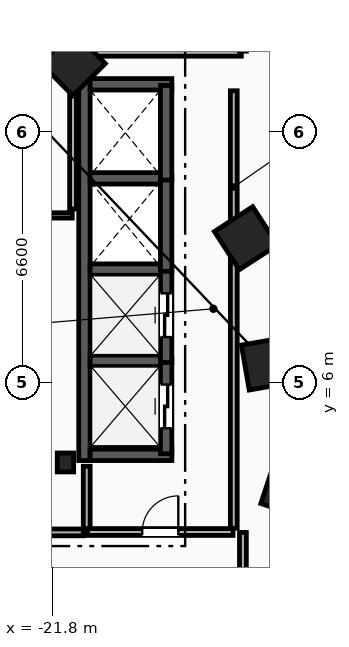
"""IFC4 building model, lengths in metres.
Left out: names, types, materials, properties, quantities, classifications, styles, units other than length and angle.
Written with IfcOpenShell. Run it as: python <this file> out.ifc"""

import sys

from ifc_helpers import new_model, si_unit, direction, frame, frame_2d, origin, origin_2d, place, context, subcontext, project, spatial, rectangle, i_section, extrude, element, fill, save


model = new_model("IFC4")
c1 = context("Model", 3, precision=1e-05, world=origin(), true_north=direction((0.0, 1.0)))
c2 = subcontext(c1, "Body", "Model", "MODEL_VIEW")
j1 = project(units=[si_unit("LENGTHUNIT", "METRE"), si_unit("PLANEANGLEUNIT", "RADIAN")], contexts=[c1])
p1 = place(None, origin())
s1 = spatial("IfcSite", under=j1, at=p1, CompositionType="ELEMENT")
p2 = place(p1, origin())
s2 = spatial("IfcBuilding", under=s1, at=p2, CompositionType="ELEMENT")
p3 = place(p2, frame((0.0, 0.0, 65.8)))
s3 = spatial("IfcBuildingStorey", under=s2, at=p3, CompositionType="ELEMENT", Elevation=65.8)
p4 = place(p3, frame((-21.45, 3.9, 0.0), z_axis=(0.0, 0.0, 1.0), x_axis=(1.0, 0.0, 0.0)))
e1 = element("IfcColumn", 1, at=p4, inside=s3, PredefinedType="COLUMN", context=c2, shape_type="SweptSolid", body=[
    extrude(i_section(OverallWidth=0.432, OverallDepth=0.498, WebThickness=0.056, FlangeThickness=0.089, FilletRadius=0.018, at=origin_2d()), origin(), (0.0, 0.0, 1.0), 3.8),
])
for number, where, z_axis, x_axis in (
    (2, (-15.55, 3.2, 0.0), (0.0, 0.0, 1.0), (0.315, 0.949, 0.0)),
    (3, (-16.125, 6.5, 0.0), (0.0, 0.0, 1.0), (-0.172, 0.985, 0.0)),
    (4, (-16.7, 9.8, 0.0), (0.0, 0.0, 1.0), (-0.544, 0.839, 0.0)),
    (5, (-21.25, 14.4, 0.0), (0.0, 0.0, 1.0), (-0.703, 0.711, 0.0)),
):
    element("IfcColumn", number, at=place(p3, frame(where, z_axis=z_axis, x_axis=x_axis)), inside=s3, PredefinedType="COLUMN", context=c2, shape_type="SweptSolid", body=[
        extrude(rectangle(XDim=1.2, YDim=1.2, at=origin_2d()), origin(), (0.0, 0.0, 1.0), 3.8),
    ])
p5 = place(p3, frame((-20.89, 2.15, 0.0), z_axis=(0.0, 0.0, 1.0), x_axis=(0.0, 1.0, 0.0)))
e6 = element("IfcWall", 6, at=p5, inside=s3, PredefinedType="PARTITIONING", context=c2, shape_type="SweptSolid", body=[
    extrude(rectangle(XDim=1.65, YDim=0.18, at=frame_2d((0.825, 0.0))), origin(), (0.0, 0.0, 1.0), 3.5),
])
p6 = place(p3, frame((-23.98, 2.06, 0.0), z_axis=(0.0, 0.0, 1.0), x_axis=(1.0, 0.0, 0.0)))
e7 = element("IfcWall", 7, at=p6, inside=s3, PredefinedType="PARTITIONING", context=c2, shape_type="SweptSolid", body=[
    extrude(rectangle(XDim=3.0, YDim=0.18, at=frame_2d((1.5, 0.0))), origin(), (0.0, 0.0, 1.0), 3.5),
])
p7 = place(p6, frame((0.9, 0.0, 0.0)))
e8 = element("IfcOpeningElement", 8, at=p7, cuts=e7, PredefinedType="OPENING", context=c2, shape_type="SweptSolid", body=[
    extrude(rectangle(XDim=1.2, YDim=2.15, at=frame_2d((0.6, 1.075))), frame((0.0, 0.1, 0.0), z_axis=(0.0, -1.0, 0.0), x_axis=(1.0, 0.0, 0.0)), (0.0, 0.0, 1.0), 0.2),
])
p8 = place(p3, frame((-20.95, 3.95, 0.0), z_axis=(0.0, 0.0, 1.0), x_axis=(0.0, 1.0, 0.0)))
e9 = element("IfcWall", 9, at=p8, inside=s3, PredefinedType="SHEAR", context=c2, shape_type="SweptSolid", body=[
    extrude(rectangle(XDim=10.05, YDim=0.3, at=frame_2d((5.025, 0.0))), origin(), (0.0, 0.0, 1.0), 3.5),
])
for number, where, z_axis, x_axis in (
    (10, (-20.8, 4.1, 0.0), (0.0, 0.0, 1.0), (1.0, 0.0, 0.0)),
    (11, (-20.8, 13.85, 0.0), (0.0, 0.0, 1.0), (1.0, 0.0, 0.0)),
):
    element("IfcWall", number, at=place(p3, frame(where, z_axis=z_axis, x_axis=x_axis)), inside=s3, PredefinedType="SHEAR", context=c2, shape_type="SweptSolid", body=[
        extrude(rectangle(XDim=2.15, YDim=0.3, at=frame_2d((1.075, 0.0))), origin(), (0.0, 0.0, 1.0), 3.5),
    ])
for number, where, z_axis, x_axis in (
    (12, (-20.8, 6.575, 0.0), (0.0, 0.0, 1.0), (1.0, 0.0, 0.0)),
    (13, (-20.8, 8.975, 0.0), (0.0, 0.0, 1.0), (1.0, 0.0, 0.0)),
    (14, (-20.8, 11.375, 0.0), (0.0, 0.0, 1.0), (1.0, 0.0, 0.0)),
):
    element("IfcWall", number, at=place(p3, frame(where, z_axis=z_axis, x_axis=x_axis)), inside=s3, PredefinedType="SHEAR", context=c2, shape_type="SweptSolid", body=[
        extrude(rectangle(XDim=1.85, YDim=0.3, at=frame_2d((0.925, 0.0))), origin(), (0.0, 0.0, 1.0), 3.5),
    ])
p9 = place(p3, frame((-18.8, 4.13, 0.0), z_axis=(0.0, 0.0, 1.0), x_axis=(0.0, 1.0, 0.0)))
e15 = element("IfcWall", 15, at=p9, inside=s3, PredefinedType="SHEAR", context=c2, shape_type="SweptSolid", body=[
    extrude(rectangle(XDim=2.49, YDim=0.3, at=frame_2d((1.245, 0.0))), origin(), (0.0, 0.0, 1.0), 3.5),
])
p10 = place(p9, frame((0.67, 0.0, 0.0)))
e16 = element("IfcOpeningElement", 16, at=p10, cuts=e15, PredefinedType="OPENING", context=c2, shape_type="SweptSolid", body=[
    extrude(rectangle(XDim=1.15, YDim=2.2, at=frame_2d((0.575, 1.1))), frame((0.0, 0.16, 0.0), z_axis=(0.0, -1.0, 0.0), x_axis=(1.0, 0.0, 0.0)), (0.0, 0.0, 1.0), 0.32),
])
p11 = place(p3, frame((-18.8, 6.53, 0.0), z_axis=(0.0, 0.0, 1.0), x_axis=(0.0, 1.0, 0.0)))
e17 = element("IfcWall", 17, at=p11, inside=s3, PredefinedType="SHEAR", context=c2, shape_type="SweptSolid", body=[
    extrude(rectangle(XDim=2.49, YDim=0.3, at=frame_2d((1.245, 0.0))), origin(), (0.0, 0.0, 1.0), 3.5),
])
p12 = place(p11, frame((0.67, 0.0, 0.0)))
e18 = element("IfcOpeningElement", 18, at=p12, cuts=e17, PredefinedType="OPENING", context=c2, shape_type="SweptSolid", body=[
    extrude(rectangle(XDim=1.15, YDim=2.2, at=frame_2d((0.575, 1.1))), frame((0.0, 0.16, 0.0), z_axis=(0.0, -1.0, 0.0), x_axis=(1.0, 0.0, 0.0)), (0.0, 0.0, 1.0), 0.32),
])
for number, where, z_axis, x_axis in (
    (19, (-18.8, 8.93, 0.0), (0.0, 0.0, 1.0), (0.0, 1.0, 0.0)),
    (20, (-18.8, 11.33, 0.0), (0.0, 0.0, 1.0), (0.0, 1.0, 0.0)),
):
    element("IfcWall", number, at=place(p3, frame(where, z_axis=z_axis, x_axis=x_axis)), inside=s3, PredefinedType="SHEAR", context=c2, shape_type="SweptSolid", body=[
        extrude(rectangle(XDim=2.49, YDim=0.3, at=frame_2d((1.245, 0.0))), origin(), (0.0, 0.0, 1.0), 3.5),
    ])
p13 = place(p3, frame((-17.02, 2.17, 0.0), z_axis=(0.0, 0.0, 1.0), x_axis=(0.0, 1.0, 0.0)))
e21 = element("IfcWall", 21, at=p13, inside=s3, PredefinedType="PARTITIONING", context=c2, shape_type="SweptSolid", body=[
    extrude(rectangle(XDim=11.51, YDim=0.18, at=frame_2d((5.755, 0.0))), origin(), (0.0, 0.0, 1.0), 3.5),
])
p14 = place(p3, frame((-20.87, 2.07, 0.0), z_axis=(0.0, 0.0, 1.0), x_axis=(1.0, 0.0, 0.0)))
e22 = element("IfcWall", 22, at=p14, inside=s3, PredefinedType="PARTITIONING", context=c2, shape_type="SweptSolid", body=[
    extrude(rectangle(XDim=3.83, YDim=0.18, at=frame_2d((1.915, 0.0))), origin(), (0.0, 0.0, 1.0), 3.5),
])
p15 = place(p14, frame((1.44, 0.0, 0.0)))
e23 = element("IfcOpeningElement", 23, at=p15, cuts=e22, PredefinedType="OPENING", context=c2, shape_type="SweptSolid", body=[
    extrude(rectangle(XDim=0.95, YDim=2.1, at=frame_2d((0.475, 1.05))), frame((0.0, 0.1, 0.0), z_axis=(0.0, -1.0, 0.0), x_axis=(1.0, 0.0, 0.0)), (0.0, 0.0, 1.0), 0.2),
])
p16 = place(p3, frame((-21.86, 10.4, 0.0), z_axis=(0.0, 0.0, 1.0), x_axis=(1.0, 0.0, 0.0)))
e24 = element("IfcWall", 24, at=p16, inside=s3, PredefinedType="PARTITIONING", context=c2, shape_type="SweptSolid", body=[
    extrude(rectangle(XDim=0.59, YDim=0.14, at=frame_2d((0.295, 0.0))), origin(), (0.0, 0.0, 1.0), 3.5),
])
p17 = place(p3, frame((-21.25, 10.57, 0.0), z_axis=(0.0, 0.0, 1.0), x_axis=(0.0, 1.0, 0.0)))
e25 = element("IfcWall", 25, at=p17, inside=s3, PredefinedType="PARTITIONING", context=c2, shape_type="SweptSolid", body=[
    extrude(rectangle(XDim=4.36, YDim=0.18, at=frame_2d((2.18, 0.0))), origin(), (0.0, 0.0, 1.0), 3.5),
])
p18 = place(p3, frame((-21.178, 14.68, 0.0), z_axis=(0.0, 0.0, 1.0), x_axis=(1.0, 0.0, 0.0)))
e26 = element("IfcWall", 26, at=p18, inside=s3, PredefinedType="PARTITIONING", context=c2, shape_type="SweptSolid", body=[
    extrude(rectangle(XDim=4.357, YDim=0.18, at=frame_2d((2.178, 0.0))), origin(), (0.0, 0.0, 1.0), 3.5),
])
p19 = place(p3, frame((-16.78, -0.329, 0.0), z_axis=(0.0, 0.0, 1.0), x_axis=(0.0, 1.0, 0.0)))
e27 = element("IfcWall", 27, at=p19, inside=s3, PredefinedType="PARTITIONING", context=c2, shape_type="SweptSolid", body=[
    extrude(rectangle(XDim=2.387, YDim=0.18, at=frame_2d((1.194, 0.0))), origin(), (0.0, 0.0, 1.0), 3.5),
])
p20 = place(p10, origin())
e28 = element("IfcDoor", 28, at=p20, inside=s3, OperationType="SLIDING_TO_LEFT", PredefinedType="TRAPDOOR", context=c2, shape_type="SweptSolid", body=[
    extrude(rectangle(XDim=1.15, YDim=2.2, at=frame_2d((0.575, 1.1))), frame((0.0, 0.025, 0.0), z_axis=(0.0, -1.0, 0.0), x_axis=(1.0, 0.0, 0.0)), (0.0, 0.0, 1.0), 0.05),
])
fill(e16, e28)
p21 = place(p12, origin())
e29 = element("IfcDoor", 29, at=p21, inside=s3, OperationType="SLIDING_TO_LEFT", PredefinedType="TRAPDOOR", context=c2, shape_type="SweptSolid", body=[
    extrude(rectangle(XDim=1.15, YDim=2.2, at=frame_2d((0.575, 1.1))), frame((0.0, 0.025, 0.0), z_axis=(0.0, -1.0, 0.0), x_axis=(1.0, 0.0, 0.0)), (0.0, 0.0, 1.0), 0.05),
])
fill(e18, e29)
p22 = place(p15, origin())
e30 = element("IfcDoor", 30, at=p22, inside=s3, OperationType="SINGLE_SWING_RIGHT", PredefinedType="DOOR", context=c2, shape_type="SweptSolid", body=[
    extrude(rectangle(XDim=0.95, YDim=2.1, at=frame_2d((0.475, 1.05))), frame((0.0, 0.025, 0.0), z_axis=(0.0, -1.0, 0.0), x_axis=(1.0, 0.0, 0.0)), (0.0, 0.0, 1.0), 0.05),
])
fill(e23, e30)
save(model, sys.argv[1])
